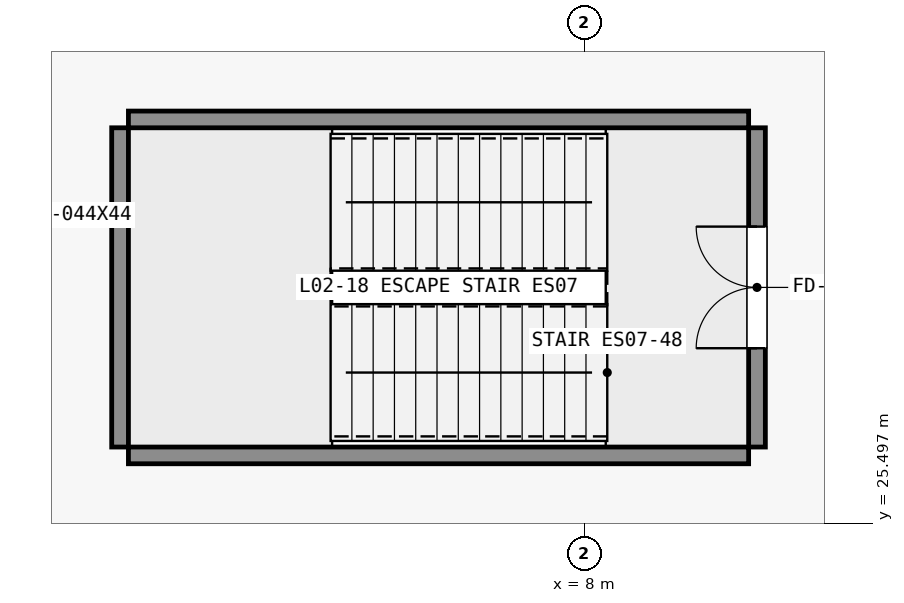
"""IFC4 building model, lengths in metres.
Left out: names, types, materials, properties, quantities, classifications, styles, units other than length and angle.
Written with IfcOpenShell. Run it as: python <this file> out.ifc"""

import sys

from ifc_helpers import new_model, si_unit, direction, frame, frame_2d, origin, place, context, subcontext, project, spatial, rectangle, extrude, element, fill, save


model = new_model("IFC4")
c1 = context("Model", 3, precision=1e-05, world=origin(), true_north=direction((0.0, 1.0)))
c2 = subcontext(c1, "Body", "Model", "MODEL_VIEW")
j1 = project(units=[si_unit("LENGTHUNIT", "METRE"), si_unit("PLANEANGLEUNIT", "RADIAN")], contexts=[c1])
p1 = place(None, origin())
s1 = spatial("IfcSite", under=j1, at=p1, CompositionType="ELEMENT")
p2 = place(p1, origin())
s2 = spatial("IfcBuilding", under=s1, at=p2, CompositionType="ELEMENT")
p3 = place(p2, frame((0.0, 0.0, 11.4)))
s3 = spatial("IfcBuildingStorey", under=s2, at=p3, CompositionType="ELEMENT", Elevation=11.4)
for number, where, z_axis, x_axis in (
    (1, (2.0, 26.39, 0.0), (0.0, 0.0, 1.0), (1.0, 0.0, 0.0)),
    (2, (2.0, 30.81, 0.0), (0.0, 0.0, 1.0), (1.0, 0.0, 0.0)),
):
    element("IfcWall", number, at=place(p3, frame(where, z_axis=z_axis, x_axis=x_axis)), inside=s3, PredefinedType="SHEAR", context=c2, shape_type="SweptSolid", body=[
        extrude(rectangle(XDim=8.16, YDim=0.22, at=frame_2d((4.08, 0.0))), origin(), (0.0, 0.0, 1.0), 4.8),
    ])
p4 = place(p3, frame((1.89, 26.5, 0.0), z_axis=(0.0, 0.0, 1.0), x_axis=(0.0, 1.0, 0.0)))
e3 = element("IfcWall", 3, at=p4, inside=s3, PredefinedType="SHEAR", context=c2, shape_type="SweptSolid", body=[
    extrude(rectangle(XDim=4.2, YDim=0.22, at=frame_2d((2.1, 0.0))), origin(), (0.0, 0.0, 1.0), 4.8),
])
p5 = place(p3, frame((10.27, 26.5, 0.0), z_axis=(0.0, 0.0, 1.0), x_axis=(0.0, 1.0, 0.0)))
e4 = element("IfcWall", 4, at=p5, inside=s3, PredefinedType="SHEAR", context=c2, shape_type="SweptSolid", body=[
    extrude(rectangle(XDim=4.2, YDim=0.22, at=frame_2d((2.1, 0.0))), origin(), (0.0, 0.0, 1.0), 4.8),
])
p6 = place(p5, frame((1.3, 0.0, 0.0)))
e5 = element("IfcOpeningElement", 5, at=p6, cuts=e4, PredefinedType="OPENING", context=c2, shape_type="SweptSolid", body=[
    extrude(rectangle(XDim=1.6, YDim=2.2, at=frame_2d((0.8, 1.1))), frame((0.0, 0.12, 0.0), z_axis=(0.0, -1.0, 0.0), x_axis=(1.0, 0.0, 0.0)), (0.0, 0.0, 1.0), 0.24),
])
p7 = place(p6, origin())
e6 = element("IfcDoor", 6, at=p7, inside=s3, OperationType="DOUBLE_DOOR_SINGLE_SWING", PredefinedType="DOOR", context=c2, shape_type="SweptSolid", body=[
    extrude(rectangle(XDim=1.6, YDim=2.2, at=frame_2d((0.8, 1.1))), frame((0.0, 0.025, 0.0), z_axis=(0.0, -1.0, 0.0), x_axis=(1.0, 0.0, 0.0)), (0.0, 0.0, 1.0), 0.05),
])
fill(e5, e6)
save(model, sys.argv[1])
